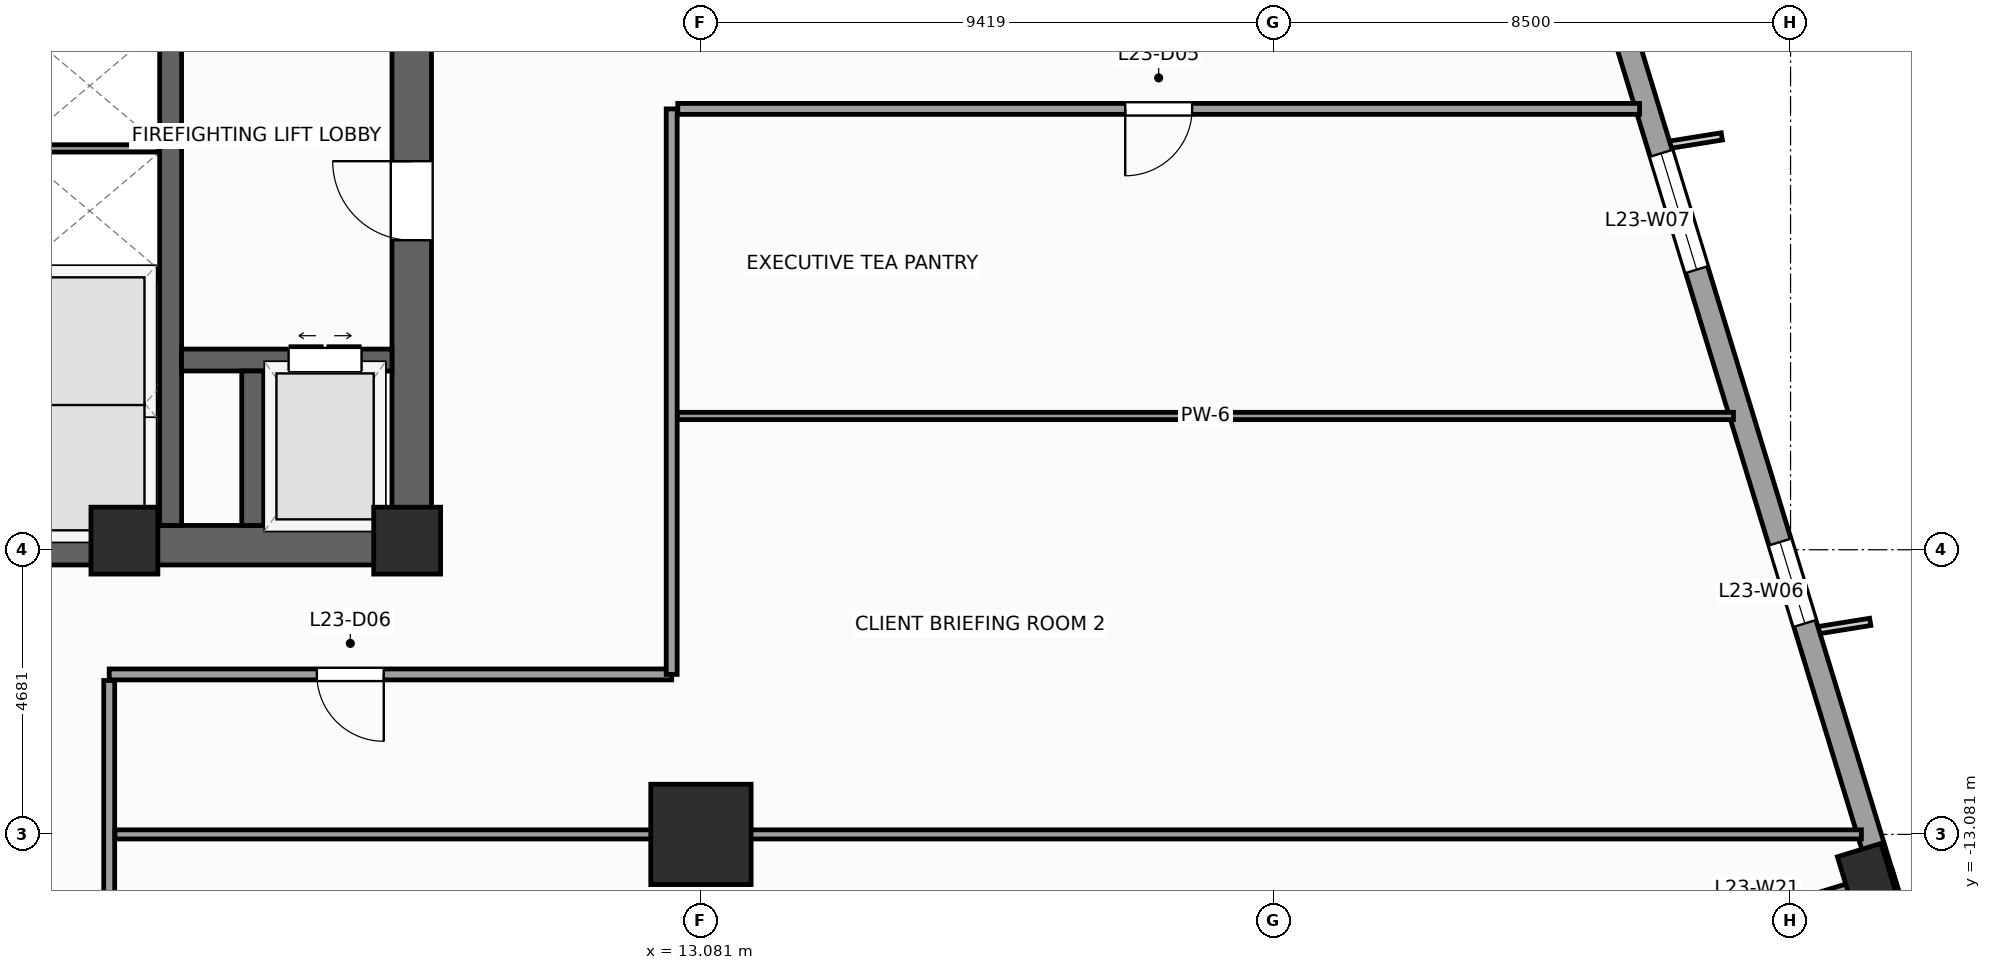
"""IFC4 building model, lengths in metres.
Left out: names, types, materials, properties, quantities, classifications, styles, units other than length and angle.
Written with IfcOpenShell. Run it as: python <this file> out.ifc"""

import sys

from ifc_helpers import new_model, si_unit, direction, frame, frame_2d, origin, origin_2d, place, context, subcontext, project, spatial, rectangle, extrude, source, transform, mapped, element, fill, save


model = new_model("IFC4")
c1 = context("Model", 3, precision=1e-05, world=origin(), true_north=direction((0.0, 1.0)))
c2 = subcontext(c1, "Body", "Model", "MODEL_VIEW")
j1 = project(units=[si_unit("LENGTHUNIT", "METRE"), si_unit("PLANEANGLEUNIT", "RADIAN")], contexts=[c1])
p1 = place(None, origin())
s1 = spatial("IfcSite", under=j1, at=p1, CompositionType="ELEMENT")
p2 = place(p1, origin())
s2 = spatial("IfcBuilding", under=s1, at=p2, CompositionType="ELEMENT")
p3 = place(p2, frame((0.0, 0.0, 99.2)))
s3 = spatial("IfcBuildingStorey", under=s2, at=p3, CompositionType="ELEMENT", Elevation=99.2)
p4 = place(p3, frame((-8.65, -8.325, 0.0), z_axis=(0.0, 0.0, 1.0), x_axis=(1.0, 0.0, 0.0)))
e1 = element("IfcWall", 1, at=p4, inside=s3, PredefinedType="SHEAR", context=c2, shape_type="SweptSolid", body=[
    extrude(rectangle(XDim=17.3, YDim=0.65, at=frame_2d((8.65, 0.0))), origin(), (0.0, 0.0, 1.0), 4.0),
])
p5 = place(p4, frame((8.0, 0.0, 0.0)))
e2 = element("IfcOpeningElement", 2, at=p5, cuts=e1, PredefinedType="OPENING", context=c2, shape_type="SweptSolid", body=[
    extrude(rectangle(XDim=1.3, YDim=2.2, at=frame_2d((0.65, 1.1))), frame((0.0, 0.335, 0.0), z_axis=(0.0, -1.0, 0.0), x_axis=(1.0, 0.0, 0.0)), (0.0, 0.0, 1.0), 0.67),
])
p6 = place(p3, frame((8.325, -8.0, 0.0), z_axis=(0.0, 0.0, 1.0), x_axis=(0.0, 1.0, 0.0)))
e3 = element("IfcWall", 3, at=p6, inside=s3, PredefinedType="SHEAR", context=c2, shape_type="SweptSolid", body=[
    extrude(rectangle(XDim=16.0, YDim=0.65, at=frame_2d((8.0, 0.0))), origin(), (0.0, 0.0, 1.0), 4.0),
])
p7 = place(p6, frame((4.69, 0.0, 0.0)))
e4 = element("IfcOpeningElement", 4, at=p7, cuts=e3, PredefinedType="OPENING", context=c2, shape_type="SweptSolid", body=[
    extrude(rectangle(XDim=1.3, YDim=2.2, at=frame_2d((0.65, 1.1))), frame((0.0, 0.335, 0.0), z_axis=(0.0, -1.0, 0.0), x_axis=(1.0, 0.0, 0.0)), (0.0, 0.0, 1.0), 0.67),
])
p8 = place(p3, frame((4.36, -8.0, 0.0), z_axis=(0.0, 0.0, 1.0), x_axis=(0.0, 1.0, 0.0)))
e5 = element("IfcWall", 5, at=p8, inside=s3, PredefinedType="SHEAR", context=c2, shape_type="SweptSolid", body=[
    extrude(rectangle(XDim=16.0, YDim=0.36, at=frame_2d((8.0, 0.0))), origin(), (0.0, 0.0, 1.0), 4.0),
])
p9 = place(p3, frame((4.54, -5.28, 0.0), z_axis=(0.0, 0.0, 1.0), x_axis=(1.0, 0.0, 0.0)))
e6 = element("IfcWall", 6, at=p9, inside=s3, PredefinedType="SHEAR", context=c2, shape_type="SweptSolid", body=[
    extrude(rectangle(XDim=3.46, YDim=0.36, at=frame_2d((1.73, 0.0))), origin(), (0.0, 0.0, 1.0), 4.0),
])
p10 = place(p9, frame((1.76, 0.0, 0.0)))
e7 = element("IfcOpeningElement", 7, at=p10, cuts=e6, PredefinedType="OPENING", context=c2, shape_type="SweptSolid", body=[
    extrude(rectangle(XDim=1.2, YDim=2.25, at=frame_2d((0.6, 1.125))), frame((0.0, 0.19, 0.0), z_axis=(0.0, -1.0, 0.0), x_axis=(1.0, 0.0, 0.0)), (0.0, 0.0, 1.0), 0.38),
])
p11 = place(p3, frame((5.71, -8.0, 0.0), z_axis=(0.0, 0.0, 1.0), x_axis=(0.0, 1.0, 0.0)))
e8 = element("IfcWall", 8, at=p11, inside=s3, PredefinedType="SHEAR", context=c2, shape_type="SweptSolid", body=[
    extrude(rectangle(XDim=2.54, YDim=0.36, at=frame_2d((1.27, 0.0))), origin(), (0.0, 0.0, 1.0), 4.0),
])
m1 = source(origin(), c2, "Body", "SweptSolid", [
    extrude(rectangle(XDim=1.1, YDim=1.1, at=origin_2d()), origin(), (0.0, 0.0, 1.0), 4.0),
])
for number, where, z_axis, x_axis in (
    (9, (8.25, -8.25, 0.0), (0.0, 0.0, 1.0), (1.0, 0.0, 0.0)),
    (10, (3.6, -8.25, 0.0), (0.0, 0.0, 1.0), (1.0, 0.0, 0.0)),
):
    element("IfcColumn", number, at=place(p3, frame(where, z_axis=z_axis, x_axis=x_axis)), inside=s3, PredefinedType="PILASTER", context=c2, shape_type="MappedRepresentation", body=[
        mapped(m1, transform((0.0, 0.0, 0.0), scale=1.0)),
    ])
m2 = source(origin(), c2, "Body", "SweptSolid", [
    extrude(rectangle(XDim=1.65, YDim=1.65, at=origin_2d()), origin(), (0.0, 0.0, 1.0), 4.0),
])
p12 = place(p3, frame((13.081, -13.081, 0.0), z_axis=(0.0, 0.0, 1.0), x_axis=(1.0, 0.0, 0.0)))
e11 = element("IfcColumn", 11, at=p12, inside=s3, PredefinedType="COLUMN", context=c2, shape_type="MappedRepresentation", body=[
    mapped(m2, transform((0.0, 0.0, 0.0), scale=1.0)),
])
m3 = source(origin(), c2, "Body", "SweptSolid", [
    extrude(rectangle(XDim=0.75, YDim=0.85, at=origin_2d()), origin(), (0.0, 0.0, 1.0), 4.0),
])
p13 = place(p3, frame((32.253, -13.746, 0.0), z_axis=(0.0, 0.0, 1.0), x_axis=(0.956304755963, 0.292371704723, 0.0)))
e12 = element("IfcColumn", 12, at=p13, inside=s3, PredefinedType="COLUMN", context=c2, shape_type="MappedRepresentation", body=[
    mapped(m3, transform((0.0, 0.0, 0.0), scale=1.0)),
])
p14 = place(p3, frame((28.482, -15.144, 0.0), z_axis=(0.0, 0.0, 1.0), x_axis=(0.956304176051, 0.292373601522, 0.0)))
e13 = element("IfcWall", 13, at=p14, inside=s3, PredefinedType="STANDARD", context=c2, shape_type="SweptSolid", body=[
    extrude(rectangle(XDim=4.44, YDim=0.38, at=frame_2d((2.22, 0.0))), origin(), (0.0, 0.0, 1.0), 3.04),
])
p15 = place(p14, frame((1.52, 0.0, 0.51)))
e14 = element("IfcOpeningElement", 14, at=p15, cuts=e13, PredefinedType="OPENING", context=c2, shape_type="SweptSolid", body=[
    extrude(rectangle(XDim=1.4, YDim=2.4, at=frame_2d((0.7, 1.2))), frame((0.0, 0.2, 0.0), z_axis=(0.0, -1.0, 0.0), x_axis=(1.0, 0.0, 0.0)), (0.0, 0.0, 1.0), 0.4),
])
p16 = place(p3, frame((32.658, -14.265, 0.0), z_axis=(0.0, 0.0, 1.0), x_axis=(-0.292373127906, 0.956304320851, 0.0)))
e15 = element("IfcWall", 15, at=p16, inside=s3, PredefinedType="STANDARD", context=c2, shape_type="SweptSolid", body=[
    extrude(rectangle(XDim=46.38, YDim=0.38, at=frame_2d((23.19, 0.0))), origin(), (0.0, 0.0, 1.0), 3.14),
])
p17 = place(p16, frame((4.865, 0.0, 0.51)))
e16 = element("IfcOpeningElement", 16, at=p17, cuts=e15, PredefinedType="OPENING", context=c2, shape_type="SweptSolid", body=[
    extrude(rectangle(XDim=1.4, YDim=2.4, at=frame_2d((0.7, 1.2))), frame((0.0, 0.2, 0.0), z_axis=(0.0, -1.0, 0.0), x_axis=(1.0, 0.0, 0.0)), (0.0, 0.0, 1.0), 0.4),
])
p18 = place(p16, frame((10.95, 0.0, 0.51)))
e17 = element("IfcOpeningElement", 17, at=p18, cuts=e15, PredefinedType="OPENING", context=c2, shape_type="SweptSolid", body=[
    extrude(rectangle(XDim=2.0, YDim=2.4, at=frame_2d((1.0, 1.2))), frame((0.0, 0.2, 0.0), z_axis=(0.0, -1.0, 0.0), x_axis=(1.0, 0.0, 0.0)), (0.0, 0.0, 1.0), 0.4),
])
p19 = place(p16, frame((20.512, 0.0, 0.51)))
e18 = element("IfcOpeningElement", 18, at=p19, cuts=e15, PredefinedType="OPENING", context=c2, shape_type="SweptSolid", body=[
    extrude(rectangle(XDim=2.0, YDim=2.4, at=frame_2d((1.0, 1.2))), frame((0.0, 0.2, 0.0), z_axis=(0.0, -1.0, 0.0), x_axis=(1.0, 0.0, 0.0)), (0.0, 0.0, 1.0), 0.4),
])
p20 = place(p16, frame((30.538, 0.0, 0.51)))
e19 = element("IfcOpeningElement", 19, at=p20, cuts=e15, PredefinedType="OPENING", context=c2, shape_type="SweptSolid", body=[
    extrude(rectangle(XDim=2.0, YDim=2.4, at=frame_2d((1.0, 1.2))), frame((0.0, 0.2, 0.0), z_axis=(0.0, -1.0, 0.0), x_axis=(1.0, 0.0, 0.0)), (0.0, 0.0, 1.0), 0.4),
])
p21 = place(p16, frame((39.187, 0.0, 0.51)))
e20 = element("IfcOpeningElement", 20, at=p21, cuts=e15, PredefinedType="OPENING", context=c2, shape_type="SweptSolid", body=[
    extrude(rectangle(XDim=1.4, YDim=2.4, at=frame_2d((0.7, 1.2))), frame((0.0, 0.2, 0.0), z_axis=(0.0, -1.0, 0.0), x_axis=(1.0, 0.0, 0.0)), (0.0, 0.0, 1.0), 0.4),
])
p22 = place(p3, frame((1.89, -3.9, 0.0), z_axis=(0.0, 0.0, 1.0), x_axis=(1.0, 0.0, 0.0)))
e21 = element("IfcWall", 21, at=p22, inside=s3, PredefinedType="PARTITIONING", context=c2, shape_type="SweptSolid", body=[
    extrude(rectangle(XDim=2.28, YDim=0.18, at=frame_2d((1.14, 0.0))), origin(), (0.0, 0.0, 1.0), 3.74),
])
for number, where, z_axis, x_axis in (
    (22, (1.9, -6.0, 0.0), (0.0, 0.0, 1.0), (1.0, 0.0, 0.0)),
    (23, (1.9, -1.8, 0.0), (0.0, 0.0, 1.0), (1.0, 0.0, 0.0)),
):
    element("IfcWall", number, at=place(p3, frame(where, z_axis=z_axis, x_axis=x_axis)), inside=s3, PredefinedType="PARTITIONING", context=c2, shape_type="SweptSolid", body=[
        extrude(rectangle(XDim=2.26, YDim=0.12, at=frame_2d((1.13, 0.0))), origin(), (0.0, 0.0, 1.0), 3.74),
    ])
p23 = place(p3, frame((3.35, -10.45, 0.0), z_axis=(0.0, 0.0, 1.0), x_axis=(1.0, 0.0, 0.0)))
e24 = element("IfcWall", 24, at=p23, inside=s3, PredefinedType="PARTITIONING", context=c2, shape_type="SweptSolid", body=[
    extrude(rectangle(XDim=9.25, YDim=0.18, at=frame_2d((4.625, 0.0))), origin(), (0.0, 0.0, 1.0), 3.74),
])
p24 = place(p23, frame((3.415, 0.0, 0.0)))
e25 = element("IfcOpeningElement", 25, at=p24, cuts=e24, PredefinedType="OPENING", context=c2, shape_type="SweptSolid", body=[
    extrude(rectangle(XDim=1.1, YDim=2.2, at=frame_2d((0.55, 1.1))), frame((0.0, 0.1, 0.0), z_axis=(0.0, -1.0, 0.0), x_axis=(1.0, 0.0, 0.0)), (0.0, 0.0, 1.0), 0.2),
])
p25 = place(p3, frame((12.6, -10.45, 0.0), z_axis=(0.0, 0.0, 1.0), x_axis=(0.0, 1.0, 0.0)))
e26 = element("IfcWall", 26, at=p25, inside=s3, PredefinedType="PARTITIONING", context=c2, shape_type="SweptSolid", body=[
    extrude(rectangle(XDim=9.3, YDim=0.18, at=frame_2d((4.65, 0.0))), origin(), (0.0, 0.0, 1.0), 3.74),
])
p26 = place(p3, frame((12.7, -1.15, 0.0), z_axis=(0.0, 0.0, 1.0), x_axis=(1.0, 0.0, 0.0)))
e27 = element("IfcWall", 27, at=p26, inside=s3, PredefinedType="PARTITIONING", context=c2, shape_type="SweptSolid", body=[
    extrude(rectangle(XDim=15.817, YDim=0.18, at=frame_2d((7.909, 0.0))), origin(), (0.0, 0.0, 1.0), 3.74),
])
p27 = place(p26, frame((7.359, 0.0, 0.0)))
e28 = element("IfcOpeningElement", 28, at=p27, cuts=e27, PredefinedType="OPENING", context=c2, shape_type="SweptSolid", body=[
    extrude(rectangle(XDim=1.1, YDim=2.2, at=frame_2d((0.55, 1.1))), frame((0.0, 0.1, 0.0), z_axis=(0.0, -1.0, 0.0), x_axis=(1.0, 0.0, 0.0)), (0.0, 0.0, 1.0), 0.2),
])
p28 = place(p3, frame((3.35, -27.142, 0.0), z_axis=(0.0, 0.0, 1.0), x_axis=(0.0, 1.0, 0.0)))
e29 = element("IfcWall", 29, at=p28, inside=s3, PredefinedType="PARTITIONING", context=c2, shape_type="SweptSolid", body=[
    extrude(rectangle(XDim=16.592, YDim=0.18, at=frame_2d((8.296, 0.0))), origin(), (0.0, 0.0, 1.0), 3.41),
])
p29 = place(p28, frame((6.645, 0.0, 0.0)))
e30 = element("IfcOpeningElement", 30, at=p29, cuts=e29, PredefinedType="OPENING", context=c2, shape_type="SweptSolid", body=[
    extrude(rectangle(XDim=1.1, YDim=2.2, at=frame_2d((0.55, 1.1))), frame((0.0, 0.1, 0.0), z_axis=(0.0, -1.0, 0.0), x_axis=(1.0, 0.0, 0.0)), (0.0, 0.0, 1.0), 0.2),
])
p30 = place(p3, frame((3.445, -13.081, 0.0), z_axis=(0.0, 0.0, 1.0), x_axis=(1.0, 0.0, 0.0)))
e31 = element("IfcWall", 31, at=p30, inside=s3, PredefinedType="PARTITIONING", context=c2, shape_type="SweptSolid", body=[
    extrude(rectangle(XDim=28.72, YDim=0.15, at=frame_2d((14.36, 0.0))), origin(), (0.0, 0.0, 1.0), 2.732),
])
p31 = place(p3, frame((12.695, -6.2, 0.0), z_axis=(0.0, 0.0, 1.0), x_axis=(1.0, 0.0, 0.0)))
e32 = element("IfcWall", 32, at=p31, inside=s3, PredefinedType="PARTITIONING", context=c2, shape_type="SweptSolid", body=[
    extrude(rectangle(XDim=17.366, YDim=0.12, at=frame_2d((8.683, 0.0))), origin(), (0.0, 0.0, 1.0), 3.74),
])
m4 = source(origin(), c2, "Body", "SweptSolid", [
    extrude(rectangle(XDim=1.4, YDim=2.4, at=frame_2d((0.7, 1.2))), frame((0.0, 0.03, 0.0), z_axis=(0.0, -1.0, 0.0), x_axis=(1.0, 0.0, 0.0)), (0.0, 0.0, 1.0), 0.06),
])
p32 = place(p17, origin())
e33 = element("IfcWindow", 33, at=p32, inside=s3, PartitioningType="SINGLE_PANEL", PredefinedType="WINDOW", context=c2, shape_type="MappedRepresentation", body=[
    mapped(m4, transform((0.0, 0.0, 0.0), scale=1.0)),
])
fill(e16, e33)
m5 = source(origin(), c2, "Body", "SweptSolid", [
    extrude(rectangle(XDim=2.0, YDim=2.4, at=frame_2d((1.0, 1.2))), frame((0.0, 0.03, 0.0), z_axis=(0.0, -1.0, 0.0), x_axis=(1.0, 0.0, 0.0)), (0.0, 0.0, 1.0), 0.06),
])
p33 = place(p18, origin())
e34 = element("IfcWindow", 34, at=p33, inside=s3, PartitioningType="SINGLE_PANEL", PredefinedType="WINDOW", context=c2, shape_type="MappedRepresentation", body=[
    mapped(m5, transform((0.0, 0.0, 0.0), scale=1.0)),
])
fill(e17, e34)
m6 = source(origin(), c2, "Body", "SweptSolid", [
    extrude(rectangle(XDim=1.3, YDim=2.2, at=frame_2d((0.65, 1.1))), frame((0.0, 0.025, 0.0), z_axis=(0.0, -1.0, 0.0), x_axis=(1.0, 0.0, 0.0)), (0.0, 0.0, 1.0), 0.05),
])
p34 = place(p7, origin())
e35 = element("IfcDoor", 35, at=p34, inside=s3, OperationType="SINGLE_SWING_RIGHT", PredefinedType="DOOR", context=c2, shape_type="MappedRepresentation", body=[
    mapped(m6, transform((0.0, 0.0, 0.0), scale=1.0)),
])
fill(e4, e35)
m7 = source(origin(), c2, "Body", "SweptSolid", [
    extrude(rectangle(XDim=1.2, YDim=2.25, at=frame_2d((0.6, 1.125))), frame((0.0, 0.025, 0.0), z_axis=(0.0, -1.0, 0.0), x_axis=(1.0, 0.0, 0.0)), (0.0, 0.0, 1.0), 0.05),
])
p35 = place(p10, origin())
e36 = element("IfcDoor", 36, at=p35, inside=s3, OperationType="DOUBLE_DOOR_SLIDING", PredefinedType="DOOR", context=c2, shape_type="MappedRepresentation", body=[
    mapped(m7, transform((0.0, 0.0, 0.0), scale=1.0)),
])
fill(e7, e36)
m8 = source(origin(), c2, "Body", "SweptSolid", [
    extrude(rectangle(XDim=1.1, YDim=2.2, at=frame_2d((0.55, 1.1))), frame((0.0, 0.025, 0.0), z_axis=(0.0, -1.0, 0.0), x_axis=(1.0, 0.0, 0.0)), (0.0, 0.0, 1.0), 0.05),
])
p36 = place(p27, frame((1.1, 0.0, 0.0), z_axis=(0.0, 0.0, 1.0), x_axis=(-1.0, 0.0, 0.0)))
e37 = element("IfcDoor", 37, at=p36, inside=s3, OperationType="SINGLE_SWING_LEFT", PredefinedType="DOOR", context=c2, shape_type="MappedRepresentation", body=[
    mapped(m8, transform((0.0, 0.0, 0.0), scale=1.0)),
])
fill(e28, e37)
p37 = place(p24, frame((1.1, 0.0, 0.0), z_axis=(0.0, 0.0, 1.0), x_axis=(-1.0, 0.0, 0.0)))
e38 = element("IfcDoor", 38, at=p37, inside=s3, OperationType="SINGLE_SWING_RIGHT", PredefinedType="DOOR", context=c2, shape_type="MappedRepresentation", body=[
    mapped(m8, transform((0.0, 0.0, 0.0), scale=1.0)),
])
fill(e25, e38)
save(model, sys.argv[1])
